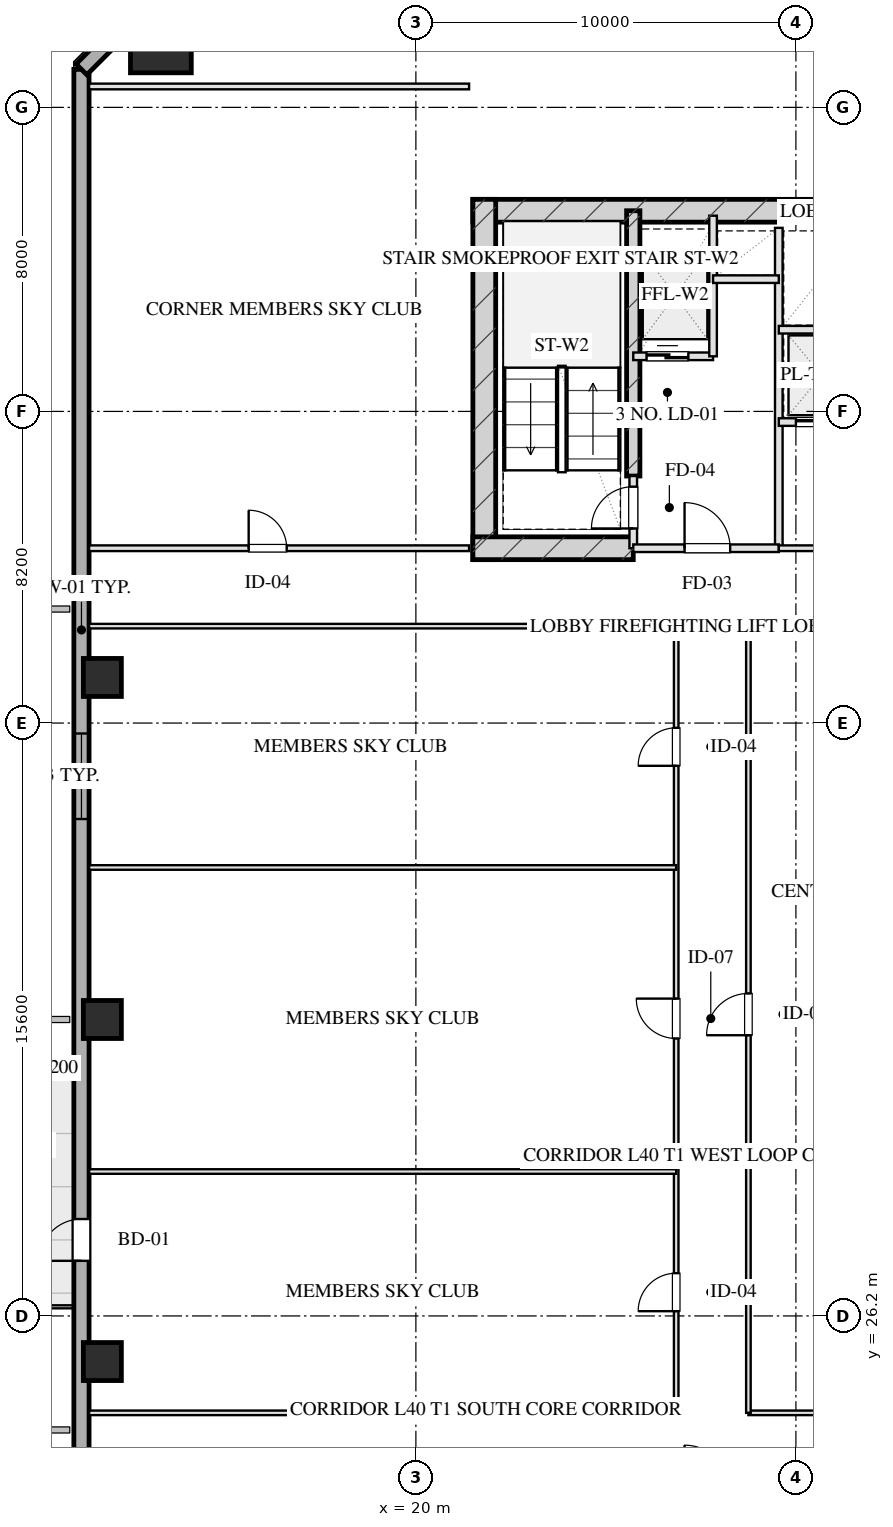
"""IFC4 building model, lengths in metres.
Left out: names, types, materials, properties, quantities, classifications, styles, units other than length and angle.
Written with IfcOpenShell. Run it as: python <this file> out.ifc"""

import sys

from ifc_helpers import new_model, si_unit, direction, frame, frame_2d, origin, origin_2d, place, context, subcontext, project, spatial, rectangle, hollow_rectangle, extrude, element, fill, save


model = new_model("IFC4")
c1 = context("Model", 3, precision=1e-05, world=origin(), true_north=direction((0.0, 1.0)))
c2 = subcontext(c1, "Body", "Model", "MODEL_VIEW")
j1 = project(units=[si_unit("LENGTHUNIT", "METRE"), si_unit("PLANEANGLEUNIT", "RADIAN")], contexts=[c1])
p1 = place(None, origin())
s1 = spatial("IfcSite", under=j1, at=p1, CompositionType="ELEMENT")
p2 = place(p1, origin())
s2 = spatial("IfcBuilding", under=s1, at=p2, CompositionType="ELEMENT")
p3 = place(p2, frame((0.0, 0.0, 152.95)))
s3 = spatial("IfcBuildingStorey", under=s2, at=p3, CompositionType="ELEMENT", Elevation=152.95)
p4 = place(p3, frame((21.5, 55.28, 0.0), z_axis=(0.0, 0.0, 1.0), x_axis=(1.0, 0.0, 0.0)))
e1 = element("IfcWall", 1, at=p4, inside=s3, PredefinedType="SHEAR", context=c2, shape_type="SweptSolid", body=[
    extrude(rectangle(XDim=17.0, YDim=0.6, at=frame_2d((8.5, 0.0))), origin(), (0.0, 0.0, 1.0), 3.45),
])
p5 = place(p3, frame((21.8, 46.1, 0.0), z_axis=(0.0, 0.0, 1.0), x_axis=(0.0, 1.0, 0.0)))
e2 = element("IfcWall", 2, at=p5, inside=s3, PredefinedType="SHEAR", context=c2, shape_type="SweptSolid", body=[
    extrude(rectangle(XDim=9.48, YDim=0.6, at=frame_2d((4.74, 0.0))), origin(), (0.0, 0.0, 1.0), 3.45),
])
p6 = place(p3, frame((25.72, 48.3, 0.0), z_axis=(0.0, 0.0, 1.0), x_axis=(0.0, 1.0, 0.0)))
e3 = element("IfcWall", 3, at=p6, inside=s3, PredefinedType="SHEAR", context=c2, shape_type="SweptSolid", body=[
    extrude(rectangle(XDim=6.98, YDim=0.35, at=frame_2d((3.49, 0.0))), origin(), (0.0, 0.0, 1.0), 3.45),
])
p7 = place(p3, frame((21.5, 46.4, 0.0), z_axis=(0.0, 0.0, 1.0), x_axis=(1.0, 0.0, 0.0)))
e4 = element("IfcWall", 4, at=p7, inside=s3, PredefinedType="SHEAR", context=c2, shape_type="SweptSolid", body=[
    extrude(rectangle(XDim=4.22, YDim=0.6, at=frame_2d((2.11, 0.0))), origin(), (0.0, 0.0, 1.0), 3.45),
])
p8 = place(p3, frame((13.29, 59.71, 0.0), z_axis=(0.0, 0.0, 1.0), x_axis=(1.0, 0.0, 0.0)))
e5 = element("IfcColumn", 5, at=p8, inside=s3, PredefinedType="COLUMN", context=c2, shape_type="SweptSolid", body=[
    extrude(hollow_rectangle(XDim=1.6, YDim=1.6, WallThickness=0.055, at=origin_2d()), origin(), (0.0, 0.0, 1.0), 3.451),
])
for number, where, z_axis, x_axis in (
    (6, (11.75, 25.0, 0.0), (0.0, 0.0, 1.0), (1.0, 0.0, 0.0)),
    (7, (11.75, 34.0, 0.0), (0.0, 0.0, 1.0), (1.0, 0.0, 0.0)),
    (8, (11.75, 43.0, 0.0), (0.0, 0.0, 1.0), (1.0, 0.0, 0.0)),
):
    element("IfcColumn", number, at=place(p3, frame(where, z_axis=z_axis, x_axis=x_axis)), inside=s3, PredefinedType="COLUMN", context=c2, shape_type="SweptSolid", body=[
        extrude(hollow_rectangle(XDim=1.0, YDim=1.0, WallThickness=0.036, at=origin_2d()), origin(), (0.0, 0.0, 1.0), 3.451),
    ])
p9 = place(p3, frame((11.2, 9.0, 0.0), z_axis=(0.0, 0.0, 1.0), x_axis=(0.0, 1.0, 0.0)))
e9 = element("IfcWall", 9, at=p9, inside=s3, PredefinedType="SOLIDWALL", context=c2, shape_type="SweptSolid", body=[
    extrude(rectangle(XDim=50.0, YDim=0.4, at=frame_2d((25.0, 0.0))), origin(), (0.0, 0.0, 1.0), 2.61),
])
p10 = place(p9, frame((30.275, 0.0, 0.75)))
e10 = element("IfcOpeningElement", 10, at=p10, cuts=e9, PredefinedType="OPENING", context=c2, shape_type="SweptSolid", body=[
    extrude(rectangle(XDim=2.25, YDim=1.46, at=frame_2d((1.125, 0.73))), frame((0.0, 0.21, 0.0), z_axis=(0.0, -1.0, 0.0), x_axis=(1.0, 0.0, 0.0)), (0.0, 0.0, 1.0), 0.42),
])
p11 = place(p9, frame((18.65, 0.0, 0.0)))
e11 = element("IfcOpeningElement", 11, at=p11, cuts=e9, PredefinedType="OPENING", context=c2, shape_type="SweptSolid", body=[
    extrude(rectangle(XDim=1.1, YDim=2.15, at=frame_2d((0.55, 1.075))), frame((0.0, 0.21, 0.0), z_axis=(0.0, -1.0, 0.0), x_axis=(1.0, 0.0, 0.0)), (0.0, 0.0, 1.0), 0.42),
])
p12 = place(p3, frame((11.2, 59.0, 0.0), z_axis=(0.0, 0.0, 1.0), x_axis=(0.707106781187, 0.707106781187, 0.0)))
e12 = element("IfcWall", 12, at=p12, inside=s3, PredefinedType="SOLIDWALL", context=c2, shape_type="SweptSolid", body=[
    extrude(rectangle(XDim=3.96, YDim=0.4, at=frame_2d((1.98, 0.0))), origin(), (0.0, 0.0, 1.0), 2.61),
])
p13 = place(p3, frame((25.72, 46.4, 0.0), z_axis=(0.0, 0.0, 1.0), x_axis=(0.0, 1.0, 0.0)))
e13 = element("IfcWall", 13, at=p13, inside=s3, PredefinedType="PARTITIONING", context=c2, shape_type="SweptSolid", body=[
    extrude(rectangle(XDim=1.9, YDim=0.2, at=frame_2d((0.95, 0.0))), origin(), (0.0, 0.0, 1.0), 3.175),
])
p14 = place(p13, frame((0.52, 0.0, 0.0)))
e14 = element("IfcOpeningElement", 14, at=p14, cuts=e13, PredefinedType="OPENING", context=c2, shape_type="SweptSolid", body=[
    extrude(rectangle(XDim=1.1, YDim=2.05, at=frame_2d((0.55, 1.025))), frame((0.0, 0.11, 0.0), z_axis=(0.0, -1.0, 0.0), x_axis=(1.0, 0.0, 0.0)), (0.0, 0.0, 1.0), 0.22),
])
p15 = place(p3, frame((29.55, 46.4, 0.0), z_axis=(0.0, 0.0, 1.0), x_axis=(0.0, 1.0, 0.0)))
e15 = element("IfcWall", 15, at=p15, inside=s3, PredefinedType="PARTITIONING", context=c2, shape_type="SweptSolid", body=[
    extrude(rectangle(XDim=8.43, YDim=0.2, at=frame_2d((4.215, 0.0))), origin(), (0.0, 0.0, 1.0), 3.175),
])
p16 = place(p3, frame((25.72, 46.4, 0.0), z_axis=(0.0, 0.0, 1.0), x_axis=(1.0, 0.0, 0.0)))
e16 = element("IfcWall", 16, at=p16, inside=s3, PredefinedType="PARTITIONING", context=c2, shape_type="SweptSolid", body=[
    extrude(rectangle(XDim=3.83, YDim=0.2, at=frame_2d((1.915, 0.0))), origin(), (0.0, 0.0, 1.0), 3.175),
])
p17 = place(p16, frame((1.35, 0.0, 0.0)))
e17 = element("IfcOpeningElement", 17, at=p17, cuts=e16, PredefinedType="OPENING", context=c2, shape_type="SweptSolid", body=[
    extrude(rectangle(XDim=1.2, YDim=2.05, at=frame_2d((0.6, 1.025))), frame((0.0, 0.11, 0.0), z_axis=(0.0, -1.0, 0.0), x_axis=(1.0, 0.0, 0.0)), (0.0, 0.0, 1.0), 0.22),
])
p18 = place(p3, frame((25.72, 51.45, 0.0), z_axis=(0.0, 0.0, 1.0), x_axis=(1.0, 0.0, 0.0)))
e18 = element("IfcWall", 18, at=p18, inside=s3, PredefinedType="PARTITIONING", context=c2, shape_type="SweptSolid", body=[
    extrude(rectangle(XDim=2.1, YDim=0.2, at=frame_2d((1.05, 0.0))), origin(), (0.0, 0.0, 1.0), 3.175),
])
p19 = place(p18, frame((0.35, 0.0, 0.0)))
e19 = element("IfcOpeningElement", 19, at=p19, cuts=e18, PredefinedType="OPENING", context=c2, shape_type="SweptSolid", body=[
    extrude(rectangle(XDim=1.1, YDim=2.05, at=frame_2d((0.55, 1.025))), frame((0.0, 0.11, 0.0), z_axis=(0.0, -1.0, 0.0), x_axis=(1.0, 0.0, 0.0)), (0.0, 0.0, 1.0), 0.22),
])
p20 = place(p3, frame((27.82, 51.45, 0.0), z_axis=(0.0, 0.0, 1.0), x_axis=(0.0, 1.0, 0.0)))
e20 = element("IfcWall", 20, at=p20, inside=s3, PredefinedType="PARTITIONING", context=c2, shape_type="SweptSolid", body=[
    extrude(rectangle(XDim=3.7, YDim=0.2, at=frame_2d((1.85, 0.0))), origin(), (0.0, 0.0, 1.0), 3.175),
])
p21 = place(p3, frame((27.82, 53.48, 0.0), z_axis=(0.0, 0.0, 1.0), x_axis=(1.0, 0.0, 0.0)))
e21 = element("IfcWall", 21, at=p21, inside=s3, PredefinedType="PARTITIONING", context=c2, shape_type="SweptSolid", body=[
    extrude(rectangle(XDim=1.73, YDim=0.2, at=frame_2d((0.865, 0.0))), origin(), (0.0, 0.0, 1.0), 3.175),
])
p22 = place(p3, frame((29.55, 46.4, 0.0), z_axis=(0.0, 0.0, 1.0), x_axis=(1.0, 0.0, 0.0)))
e22 = element("IfcWall", 22, at=p22, inside=s3, PredefinedType="PARTITIONING", context=c2, shape_type="SweptSolid", body=[
    extrude(rectangle(XDim=4.4, YDim=0.15, at=frame_2d((2.2, 0.0))), origin(), (0.0, 0.0, 1.0), 3.175),
])
p23 = place(p22, frame((1.45, 0.0, 0.0)))
e23 = element("IfcOpeningElement", 23, at=p23, cuts=e22, PredefinedType="OPENING", context=c2, shape_type="SweptSolid", body=[
    extrude(rectangle(XDim=1.5, YDim=2.05, at=frame_2d((0.75, 1.025))), frame((0.0, 0.085, 0.0), z_axis=(0.0, -1.0, 0.0), x_axis=(1.0, 0.0, 0.0)), (0.0, 0.0, 1.0), 0.17),
])
p24 = place(p3, frame((29.55, 49.72, 0.0), z_axis=(0.0, 0.0, 1.0), x_axis=(1.0, 0.0, 0.0)))
e24 = element("IfcWall", 24, at=p24, inside=s3, PredefinedType="PARTITIONING", context=c2, shape_type="SweptSolid", body=[
    extrude(rectangle(XDim=4.4, YDim=0.2, at=frame_2d((2.2, 0.0))), origin(), (0.0, 0.0, 1.0), 3.175),
])
p25 = place(p24, frame((0.45, 0.0, 0.0)))
e25 = element("IfcOpeningElement", 25, at=p25, cuts=e24, PredefinedType="OPENING", context=c2, shape_type="SweptSolid", body=[
    extrude(rectangle(XDim=1.1, YDim=2.05, at=frame_2d((0.55, 1.025))), frame((0.0, 0.11, 0.0), z_axis=(0.0, -1.0, 0.0), x_axis=(1.0, 0.0, 0.0)), (0.0, 0.0, 1.0), 0.22),
])
p26 = place(p24, frame((2.55, 0.0, 0.0)))
e26 = element("IfcOpeningElement", 26, at=p26, cuts=e24, PredefinedType="OPENING", context=c2, shape_type="SweptSolid", body=[
    extrude(rectangle(XDim=1.1, YDim=2.05, at=frame_2d((0.55, 1.025))), frame((0.0, 0.11, 0.0), z_axis=(0.0, -1.0, 0.0), x_axis=(1.0, 0.0, 0.0)), (0.0, 0.0, 1.0), 0.22),
])
p27 = place(p3, frame((29.55, 52.15, 0.0), z_axis=(0.0, 0.0, 1.0), x_axis=(1.0, 0.0, 0.0)))
e27 = element("IfcWall", 27, at=p27, inside=s3, PredefinedType="PARTITIONING", context=c2, shape_type="SweptSolid", body=[
    extrude(rectangle(XDim=4.4, YDim=0.2, at=frame_2d((2.2, 0.0))), origin(), (0.0, 0.0, 1.0), 3.175),
])
p28 = place(p3, frame((11.4, 58.55, 0.0), z_axis=(0.0, 0.0, 1.0), x_axis=(1.0, 0.0, 0.0)))
e28 = element("IfcWall", 28, at=p28, inside=s3, PredefinedType="PARTITIONING", context=c2, shape_type="SweptSolid", body=[
    extrude(rectangle(XDim=10.0, YDim=0.15, at=frame_2d((5.0, 0.0))), origin(), (0.0, 0.0, 1.0), 3.175),
])
p29 = place(p3, frame((11.4, 46.4, 0.0), z_axis=(0.0, 0.0, 1.0), x_axis=(1.0, 0.0, 0.0)))
e29 = element("IfcWall", 29, at=p29, inside=s3, PredefinedType="PARTITIONING", context=c2, shape_type="SweptSolid", body=[
    extrude(rectangle(XDim=10.0, YDim=0.15, at=frame_2d((5.0, 0.0))), origin(), (0.0, 0.0, 1.0), 3.175),
])
p30 = place(p29, frame((4.2, 0.0, 0.0)))
e30 = element("IfcOpeningElement", 30, at=p30, cuts=e29, PredefinedType="OPENING", context=c2, shape_type="SweptSolid", body=[
    extrude(rectangle(XDim=1.0, YDim=2.05, at=frame_2d((0.5, 1.025))), frame((0.0, 0.085, 0.0), z_axis=(0.0, -1.0, 0.0), x_axis=(1.0, 0.0, 0.0)), (0.0, 0.0, 1.0), 0.17),
])
p31 = place(p3, frame((11.4, 23.65, 0.0), z_axis=(0.0, 0.0, 1.0), x_axis=(1.0, 0.0, 0.0)))
e31 = element("IfcWall", 31, at=p31, inside=s3, PredefinedType="PARTITIONING", context=c2, shape_type="SweptSolid", body=[
    extrude(rectangle(XDim=15.45, YDim=0.12, at=frame_2d((7.725, 0.0))), origin(), (0.0, 0.0, 1.0), 3.175),
])
p32 = place(p3, frame((28.75, 23.65, 0.0), z_axis=(0.0, 0.0, 1.0), x_axis=(1.0, 0.0, 0.0)))
e32 = element("IfcWall", 32, at=p32, inside=s3, PredefinedType="PARTITIONING", context=c2, shape_type="SweptSolid", body=[
    extrude(rectangle(XDim=8.25, YDim=0.12, at=frame_2d((4.125, 0.0))), origin(), (0.0, 0.0, 1.0), 3.175),
])
p33 = place(p3, frame((11.4, 44.35, 0.0), z_axis=(0.0, 0.0, 1.0), x_axis=(1.0, 0.0, 0.0)))
e33 = element("IfcWall", 33, at=p33, inside=s3, PredefinedType="PARTITIONING", context=c2, shape_type="SweptSolid", body=[
    extrude(rectangle(XDim=15.45, YDim=0.12, at=frame_2d((7.725, 0.0))), origin(), (0.0, 0.0, 1.0), 3.175),
])
p34 = place(p3, frame((28.75, 44.35, 0.0), z_axis=(0.0, 0.0, 1.0), x_axis=(1.0, 0.0, 0.0)))
e34 = element("IfcWall", 34, at=p34, inside=s3, PredefinedType="PARTITIONING", context=c2, shape_type="SweptSolid", body=[
    extrude(rectangle(XDim=8.25, YDim=0.12, at=frame_2d((4.125, 0.0))), origin(), (0.0, 0.0, 1.0), 3.175),
])
p35 = place(p3, frame((26.85, 23.65, 0.0), z_axis=(0.0, 0.0, 1.0), x_axis=(0.0, 1.0, 0.0)))
e35 = element("IfcWall", 35, at=p35, inside=s3, PredefinedType="PARTITIONING", context=c2, shape_type="SweptSolid", body=[
    extrude(rectangle(XDim=20.7, YDim=0.12, at=frame_2d((10.35, 0.0))), origin(), (0.0, 0.0, 1.0), 3.175),
])
p36 = place(p35, frame((2.675, 0.0, 0.0)))
e36 = element("IfcOpeningElement", 36, at=p36, cuts=e35, PredefinedType="OPENING", context=c2, shape_type="SweptSolid", body=[
    extrude(rectangle(XDim=1.0, YDim=2.05, at=frame_2d((0.5, 1.025))), frame((0.0, 0.07, 0.0), z_axis=(0.0, -1.0, 0.0), x_axis=(1.0, 0.0, 0.0)), (0.0, 0.0, 1.0), 0.14),
])
p37 = place(p35, frame((9.85, 0.0, 0.0)))
e37 = element("IfcOpeningElement", 37, at=p37, cuts=e35, PredefinedType="OPENING", context=c2, shape_type="SweptSolid", body=[
    extrude(rectangle(XDim=1.05, YDim=2.05, at=frame_2d((0.525, 1.025))), frame((0.0, 0.07, 0.0), z_axis=(0.0, -1.0, 0.0), x_axis=(1.0, 0.0, 0.0)), (0.0, 0.0, 1.0), 0.14),
])
p38 = place(p35, frame((17.025, 0.0, 0.0)))
e38 = element("IfcOpeningElement", 38, at=p38, cuts=e35, PredefinedType="OPENING", context=c2, shape_type="SweptSolid", body=[
    extrude(rectangle(XDim=1.0, YDim=2.05, at=frame_2d((0.5, 1.025))), frame((0.0, 0.07, 0.0), z_axis=(0.0, -1.0, 0.0), x_axis=(1.0, 0.0, 0.0)), (0.0, 0.0, 1.0), 0.14),
])
p39 = place(p3, frame((28.75, 23.65, 0.0), z_axis=(0.0, 0.0, 1.0), x_axis=(0.0, 1.0, 0.0)))
e39 = element("IfcWall", 39, at=p39, inside=s3, PredefinedType="PARTITIONING", context=c2, shape_type="SweptSolid", body=[
    extrude(rectangle(XDim=20.7, YDim=0.12, at=frame_2d((10.35, 0.0))), origin(), (0.0, 0.0, 1.0), 3.175),
])
p40 = place(p39, frame((9.936, 0.0, 0.0)))
e40 = element("IfcOpeningElement", 40, at=p40, cuts=e39, PredefinedType="OPENING", context=c2, shape_type="SweptSolid", body=[
    extrude(rectangle(XDim=1.1, YDim=2.05, at=frame_2d((0.55, 1.025))), frame((0.0, 0.07, 0.0), z_axis=(0.0, -1.0, 0.0), x_axis=(1.0, 0.0, 0.0)), (0.0, 0.0, 1.0), 0.14),
])
for number, where, z_axis, x_axis in (
    (41, (11.4, 30.0, 0.0), (0.0, 0.0, 1.0), (1.0, 0.0, 0.0)),
    (42, (11.4, 38.0, 0.0), (0.0, 0.0, 1.0), (1.0, 0.0, 0.0)),
):
    element("IfcWall", number, at=place(p3, frame(where, z_axis=z_axis, x_axis=x_axis)), inside=s3, PredefinedType="PARTITIONING", context=c2, shape_type="SweptSolid", body=[
        extrude(rectangle(XDim=15.45, YDim=0.12, at=frame_2d((7.725, 0.0))), origin(), (0.0, 0.0, 1.0), 3.175),
    ])
p41 = place(p10, origin())
e43 = element("IfcWindow", 43, at=p41, inside=s3, PartitioningType="TRIPLE_PANEL_VERTICAL", PredefinedType="WINDOW", context=c2, shape_type="SweptSolid", body=[
    extrude(rectangle(XDim=2.25, YDim=1.46, at=frame_2d((1.125, 0.73))), frame((0.0, 0.03, 0.0), z_axis=(0.0, -1.0, 0.0), x_axis=(1.0, 0.0, 0.0)), (0.0, 0.0, 1.0), 0.06),
])
fill(e10, e43)
p42 = place(p11, origin())
e44 = element("IfcDoor", 44, at=p42, inside=s3, OperationType="SINGLE_SWING_LEFT", PredefinedType="DOOR", context=c2, shape_type="SweptSolid", body=[
    extrude(rectangle(XDim=1.1, YDim=2.15, at=frame_2d((0.55, 1.075))), frame((0.0, 0.025, 0.0), z_axis=(0.0, -1.0, 0.0), x_axis=(1.0, 0.0, 0.0)), (0.0, 0.0, 1.0), 0.05),
])
fill(e11, e44)
p43 = place(p14, origin())
e45 = element("IfcDoor", 45, at=p43, inside=s3, OperationType="SINGLE_SWING_LEFT", PredefinedType="DOOR", context=c2, shape_type="SweptSolid", body=[
    extrude(rectangle(XDim=1.1, YDim=2.05, at=frame_2d((0.55, 1.025))), frame((0.0, 0.025, 0.0), z_axis=(0.0, -1.0, 0.0), x_axis=(1.0, 0.0, 0.0)), (0.0, 0.0, 1.0), 0.05),
])
fill(e14, e45)
p44 = place(p17, origin())
e46 = element("IfcDoor", 46, at=p44, inside=s3, OperationType="SINGLE_SWING_LEFT", PredefinedType="DOOR", context=c2, shape_type="SweptSolid", body=[
    extrude(rectangle(XDim=1.2, YDim=2.05, at=frame_2d((0.6, 1.025))), frame((0.0, 0.025, 0.0), z_axis=(0.0, -1.0, 0.0), x_axis=(1.0, 0.0, 0.0)), (0.0, 0.0, 1.0), 0.05),
])
fill(e17, e46)
p45 = place(p19, origin())
e47 = element("IfcDoor", 47, at=p45, inside=s3, OperationType="DOUBLE_DOOR_SLIDING", PredefinedType="DOOR", context=c2, shape_type="SweptSolid", body=[
    extrude(rectangle(XDim=1.1, YDim=2.05, at=frame_2d((0.55, 1.025))), frame((0.0, 0.025, 0.0), z_axis=(0.0, -1.0, 0.0), x_axis=(1.0, 0.0, 0.0)), (0.0, 0.0, 1.0), 0.05),
])
fill(e19, e47)
p46 = place(p25, origin())
e48 = element("IfcDoor", 48, at=p46, inside=s3, OperationType="DOUBLE_DOOR_SLIDING", PredefinedType="DOOR", context=c2, shape_type="SweptSolid", body=[
    extrude(rectangle(XDim=1.1, YDim=2.05, at=frame_2d((0.55, 1.025))), frame((0.0, 0.025, 0.0), z_axis=(0.0, -1.0, 0.0), x_axis=(1.0, 0.0, 0.0)), (0.0, 0.0, 1.0), 0.05),
])
fill(e25, e48)
p47 = place(p30, origin())
e49 = element("IfcDoor", 49, at=p47, inside=s3, OperationType="SINGLE_SWING_LEFT", PredefinedType="DOOR", context=c2, shape_type="SweptSolid", body=[
    extrude(rectangle(XDim=1.0, YDim=2.05, at=frame_2d((0.5, 1.025))), frame((0.0, 0.025, 0.0), z_axis=(0.0, -1.0, 0.0), x_axis=(1.0, 0.0, 0.0)), (0.0, 0.0, 1.0), 0.05),
])
fill(e30, e49)
p48 = place(p36, origin())
e50 = element("IfcDoor", 50, at=p48, inside=s3, OperationType="SINGLE_SWING_LEFT", PredefinedType="DOOR", context=c2, shape_type="SweptSolid", body=[
    extrude(rectangle(XDim=1.0, YDim=2.05, at=frame_2d((0.5, 1.025))), frame((0.0, 0.025, 0.0), z_axis=(0.0, -1.0, 0.0), x_axis=(1.0, 0.0, 0.0)), (0.0, 0.0, 1.0), 0.05),
])
fill(e36, e50)
p49 = place(p37, origin())
e51 = element("IfcDoor", 51, at=p49, inside=s3, OperationType="SINGLE_SWING_RIGHT", PredefinedType="DOOR", context=c2, shape_type="SweptSolid", body=[
    extrude(rectangle(XDim=1.05, YDim=2.05, at=frame_2d((0.525, 1.025))), frame((0.0, 0.025, 0.0), z_axis=(0.0, -1.0, 0.0), x_axis=(1.0, 0.0, 0.0)), (0.0, 0.0, 1.0), 0.05),
])
fill(e37, e51)
p50 = place(p38, origin())
e52 = element("IfcDoor", 52, at=p50, inside=s3, OperationType="SINGLE_SWING_LEFT", PredefinedType="DOOR", context=c2, shape_type="SweptSolid", body=[
    extrude(rectangle(XDim=1.0, YDim=2.05, at=frame_2d((0.5, 1.025))), frame((0.0, 0.025, 0.0), z_axis=(0.0, -1.0, 0.0), x_axis=(1.0, 0.0, 0.0)), (0.0, 0.0, 1.0), 0.05),
])
fill(e38, e52)
p51 = place(p40, origin())
e53 = element("IfcDoor", 53, at=p51, inside=s3, OperationType="SINGLE_SWING_LEFT", PredefinedType="DOOR", context=c2, shape_type="SweptSolid", body=[
    extrude(rectangle(XDim=1.1, YDim=2.05, at=frame_2d((0.55, 1.025))), frame((0.0, 0.025, 0.0), z_axis=(0.0, -1.0, 0.0), x_axis=(1.0, 0.0, 0.0)), (0.0, 0.0, 1.0), 0.05),
])
fill(e40, e53)
save(model, sys.argv[1])
